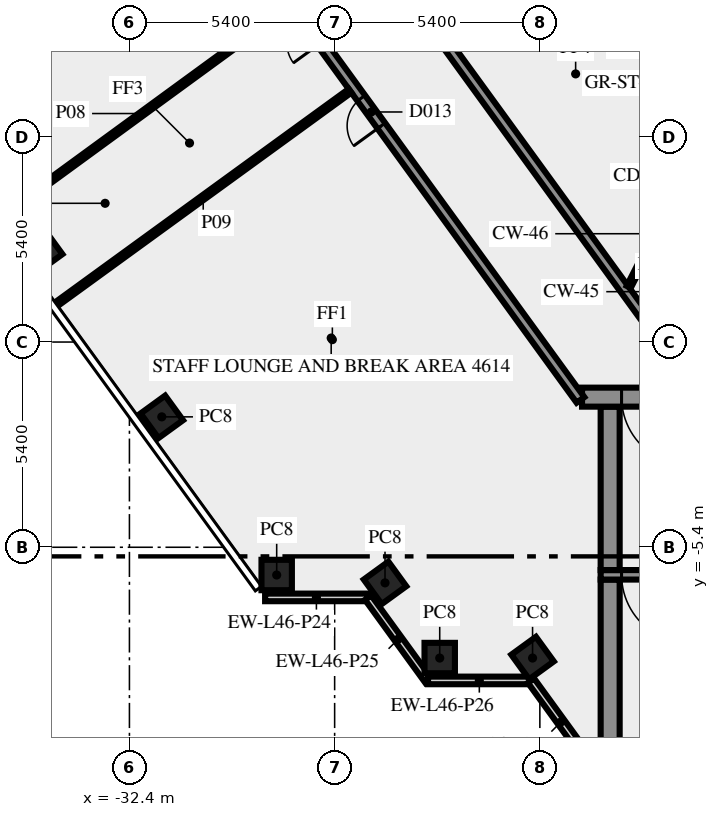
"""IFC4 building model, lengths in metres.
Left out: names, types, materials, properties, quantities, classifications, styles, units other than length and angle.
Written with IfcOpenShell. Run it as: python <this file> out.ifc"""

import sys

from ifc_helpers import new_model, si_unit, direction, frame, frame_2d, origin, origin_2d, place, context, subcontext, project, spatial, rectangle, extrude, element, fill, save


model = new_model("IFC4")
c1 = context("Model", 3, precision=1e-05, world=origin(), true_north=direction((0.0, 1.0)))
c2 = subcontext(c1, "Body", "Model", "MODEL_VIEW")
j1 = project(units=[si_unit("LENGTHUNIT", "METRE"), si_unit("PLANEANGLEUNIT", "RADIAN")], contexts=[c1])
p1 = place(None, origin())
s1 = spatial("IfcSite", under=j1, at=p1, CompositionType="ELEMENT")
p2 = place(p1, origin())
s2 = spatial("IfcBuilding", under=s1, at=p2, CompositionType="ELEMENT")
p3 = place(p2, frame((0.0, 0.0, 198.0)))
s3 = spatial("IfcBuildingStorey", under=s2, at=p3, CompositionType="ELEMENT", Elevation=198.0)
for number, where, z_axis, x_axis in (
    (1, (-34.722, 2.4, 0.0), (0.0, 0.0, 1.0), (0.588, -0.809, 0.0)),
    (2, (-31.548, -1.969, 0.0), (0.0, 0.0, 1.0), (0.588, -0.809, 0.0)),
    (3, (-28.525, -6.13, 0.0), (0.0, 0.0, 1.0), (1.0, 0.0, 0.0)),
    (4, (-25.674, -6.337, 0.0), (0.0, 0.0, 1.0), (0.588, -0.809, 0.0)),
    (5, (-24.235, -8.315, 0.0), (0.0, 0.0, 1.0), (1.0, 0.0, 0.0)),
    (6, (-21.792, -8.315, 0.0), (0.0, 0.0, 1.0), (0.588, -0.809, 0.0)),
):
    element("IfcColumn", number, at=place(p3, frame(where, z_axis=z_axis, x_axis=x_axis)), inside=s3, PredefinedType="COLUMN", context=c2, shape_type="SweptSolid", body=[
        extrude(rectangle(XDim=0.8, YDim=0.8, at=origin_2d()), origin(), (0.0, 0.0, 1.0), 3.65),
    ])
p4 = place(p3, frame((-28.83, -6.719, 0.0), z_axis=(0.0, 0.0, 1.0), x_axis=(1.0, 0.0, 0.0)))
e7 = element("IfcWall", 7, at=p4, inside=s3, PredefinedType="SOLIDWALL", context=c2, shape_type="SweptSolid", body=[
    extrude(rectangle(XDim=2.7, YDim=0.2, at=frame_2d((1.35, 0.0))), origin(), (0.0, 0.0, 1.0), 3.65),
])
p5 = place(p3, frame((-26.12, -6.724, 0.0), z_axis=(0.0, 0.0, 1.0), x_axis=(0.587720002413, -0.809064397168, 0.0)))
e8 = element("IfcWall", 8, at=p5, inside=s3, PredefinedType="SOLIDWALL", context=c2, shape_type="SweptSolid", body=[
    extrude(rectangle(XDim=2.7, YDim=0.2, at=frame_2d((1.35, 0.0))), origin(), (0.0, 0.0, 1.0), 3.65),
])
p6 = place(p3, frame((-24.543, -8.904, 0.0), z_axis=(0.0, 0.0, 1.0), x_axis=(1.0, 0.0, 0.0)))
e9 = element("IfcWall", 9, at=p6, inside=s3, PredefinedType="SOLIDWALL", context=c2, shape_type="SweptSolid", body=[
    extrude(rectangle(XDim=2.7, YDim=0.2, at=frame_2d((1.35, 0.0))), origin(), (0.0, 0.0, 1.0), 3.65),
])
p7 = place(p3, frame((-21.833, -8.909, 0.0), z_axis=(0.0, 0.0, 1.0), x_axis=(0.587766567315, -0.809030569476, 0.0)))
e10 = element("IfcWall", 10, at=p7, inside=s3, PredefinedType="SOLIDWALL", context=c2, shape_type="SweptSolid", body=[
    extrude(rectangle(XDim=2.688, YDim=0.2, at=frame_2d((1.344, 0.0))), origin(), (0.0, 0.0, 1.0), 3.65),
])
p8 = place(p3, frame((-19.75, -10.5, 0.0), z_axis=(0.0, 0.0, 1.0), x_axis=(0.0, 1.0, 0.0)))
e11 = element("IfcWall", 11, at=p8, inside=s3, PredefinedType="SHEAR", context=c2, shape_type="SweptSolid", body=[
    extrude(rectangle(XDim=4.25, YDim=0.5, at=frame_2d((2.125, 0.0))), origin(), (0.0, 0.0, 1.0), 3.65),
])
p9 = place(p3, frame((-9.2, -6.125, 0.0), z_axis=(0.0, 0.0, 1.0), x_axis=(-1.0, 0.0, 0.0)))
e12 = element("IfcWall", 12, at=p9, inside=s3, PredefinedType="SHEAR", context=c2, shape_type="SweptSolid", body=[
    extrude(rectangle(XDim=10.8, YDim=0.25, at=frame_2d((5.4, 0.0))), origin(), (0.0, 0.0, 1.0), 3.65),
])
p10 = place(p9, frame((8.45, 0.0, 0.0)))
e13 = element("IfcOpeningElement", 13, at=p10, cuts=e12, PredefinedType="OPENING", context=c2, shape_type="SweptSolid", body=[
    extrude(rectangle(XDim=1.8, YDim=2.1, at=frame_2d((0.9, 1.05))), frame((0.0, 0.135, 0.0), z_axis=(0.0, -1.0, 0.0), x_axis=(1.0, 0.0, 0.0)), (0.0, 0.0, 1.0), 0.27),
])
p11 = place(p3, frame((-19.75, -6.0, 0.0), z_axis=(0.0, 0.0, 1.0), x_axis=(0.0, 1.0, 0.0)))
e14 = element("IfcWall", 14, at=p11, inside=s3, PredefinedType="SHEAR", context=c2, shape_type="SweptSolid", body=[
    extrude(rectangle(XDim=4.3, YDim=0.5, at=frame_2d((2.15, 0.0))), origin(), (0.0, 0.0, 1.0), 3.65),
])
p12 = place(p3, frame((20.49, -1.45, 0.0), z_axis=(0.0, 0.0, 1.0), x_axis=(-1.0, 0.0, 0.0)))
e15 = element("IfcWall", 15, at=p12, inside=s3, PredefinedType="SHEAR", context=c2, shape_type="SweptSolid", body=[
    extrude(rectangle(XDim=40.98, YDim=0.5, at=frame_2d((20.49, 0.0))), origin(), (0.0, 0.0, 1.0), 3.65),
])
p13 = place(p12, frame((38.14, 0.0, 0.0)))
e16 = element("IfcOpeningElement", 16, at=p13, cuts=e15, PredefinedType="OPENING", context=c2, shape_type="SweptSolid", body=[
    extrude(rectangle(XDim=1.8, YDim=2.1, at=frame_2d((0.9, 1.05))), frame((0.0, 0.26, 0.0), z_axis=(0.0, -1.0, 0.0), x_axis=(1.0, 0.0, 0.0)), (0.0, 0.0, 1.0), 0.52),
])
p14 = place(p12, frame((35.89, 0.0, 0.0)))
e17 = element("IfcOpeningElement", 17, at=p14, cuts=e15, PredefinedType="OPENING", context=c2, shape_type="SweptSolid", body=[
    extrude(rectangle(XDim=0.9, YDim=2.1, at=frame_2d((0.45, 1.05))), frame((0.0, 0.26, 0.0), z_axis=(0.0, -1.0, 0.0), x_axis=(1.0, 0.0, 0.0)), (0.0, 0.0, 1.0), 0.52),
])
p15 = place(p12, frame((32.94, 0.0, 0.0)))
e18 = element("IfcOpeningElement", 18, at=p15, cuts=e15, PredefinedType="OPENING", context=c2, shape_type="SweptSolid", body=[
    extrude(rectangle(XDim=0.9, YDim=2.1, at=frame_2d((0.45, 1.05))), frame((0.0, 0.26, 0.0), z_axis=(0.0, -1.0, 0.0), x_axis=(1.0, 0.0, 0.0)), (0.0, 0.0, 1.0), 0.52),
])
p16 = place(p12, frame((30.302, 0.0, 0.0)))
e19 = element("IfcOpeningElement", 19, at=p16, cuts=e15, PredefinedType="OPENING", context=c2, shape_type="SweptSolid", body=[
    extrude(rectangle(XDim=0.9, YDim=2.1, at=frame_2d((0.45, 1.05))), frame((0.0, 0.26, 0.0), z_axis=(0.0, -1.0, 0.0), x_axis=(1.0, 0.0, 0.0)), (0.0, 0.0, 1.0), 0.52),
])
p17 = place(p12, frame((26.577, 0.0, 0.0)))
e20 = element("IfcOpeningElement", 20, at=p17, cuts=e15, PredefinedType="OPENING", context=c2, shape_type="SweptSolid", body=[
    extrude(rectangle(XDim=0.9, YDim=2.1, at=frame_2d((0.45, 1.05))), frame((0.0, 0.26, 0.0), z_axis=(0.0, -1.0, 0.0), x_axis=(1.0, 0.0, 0.0)), (0.0, 0.0, 1.0), 0.52),
])
p18 = place(p12, frame((19.59, 0.0, 0.0)))
e21 = element("IfcOpeningElement", 21, at=p18, cuts=e15, PredefinedType="OPENING", context=c2, shape_type="SweptSolid", body=[
    extrude(rectangle(XDim=2.0, YDim=2.1, at=frame_2d((1.0, 1.05))), frame((0.0, 0.26, 0.0), z_axis=(0.0, -1.0, 0.0), x_axis=(1.0, 0.0, 0.0)), (0.0, 0.0, 1.0), 0.52),
])
p19 = place(p12, frame((7.14, 0.0, 0.0)))
e22 = element("IfcOpeningElement", 22, at=p19, cuts=e15, PredefinedType="OPENING", context=c2, shape_type="SweptSolid", body=[
    extrude(rectangle(XDim=0.9, YDim=2.1, at=frame_2d((0.45, 1.05))), frame((0.0, 0.26, 0.0), z_axis=(0.0, -1.0, 0.0), x_axis=(1.0, 0.0, 0.0)), (0.0, 0.0, 1.0), 0.52),
])
p20 = place(p12, frame((5.028, 0.0, 0.0)))
e23 = element("IfcOpeningElement", 23, at=p20, cuts=e15, PredefinedType="OPENING", context=c2, shape_type="SweptSolid", body=[
    extrude(rectangle(XDim=0.8, YDim=2.1, at=frame_2d((0.4, 1.05))), frame((0.0, 0.26, 0.0), z_axis=(0.0, -1.0, 0.0), x_axis=(1.0, 0.0, 0.0)), (0.0, 0.0, 1.0), 0.52),
])
p21 = place(p12, frame((3.452, 0.0, 0.0)))
e24 = element("IfcOpeningElement", 24, at=p21, cuts=e15, PredefinedType="OPENING", context=c2, shape_type="SweptSolid", body=[
    extrude(rectangle(XDim=0.8, YDim=2.1, at=frame_2d((0.4, 1.05))), frame((0.0, 0.26, 0.0), z_axis=(0.0, -1.0, 0.0), x_axis=(1.0, 0.0, 0.0)), (0.0, 0.0, 1.0), 0.52),
])
p22 = place(p12, frame((1.04, 0.0, 0.0)))
e25 = element("IfcOpeningElement", 25, at=p22, cuts=e15, PredefinedType="OPENING", context=c2, shape_type="SweptSolid", body=[
    extrude(rectangle(XDim=1.8, YDim=2.1, at=frame_2d((0.9, 1.05))), frame((0.0, 0.26, 0.0), z_axis=(0.0, -1.0, 0.0), x_axis=(1.0, 0.0, 0.0)), (0.0, 0.0, 1.0), 0.52),
])
p23 = place(p3, frame((-20.531, -1.523, 0.0), z_axis=(0.0, 0.0, 1.0), x_axis=(-0.587785812891, 0.809016587076, 0.0)))
e26 = element("IfcWall", 26, at=p23, inside=s3, PredefinedType="SOLIDWALL", context=c2, shape_type="SweptSolid", body=[
    extrude(rectangle(XDim=28.67, YDim=0.25, at=frame_2d((14.335, 0.0))), origin(), (0.0, 0.0, 1.0), 3.65),
])
p24 = place(p23, frame((17.015, 0.0, 0.0)))
e27 = element("IfcOpeningElement", 27, at=p24, cuts=e26, PredefinedType="OPENING", context=c2, shape_type="SweptSolid", body=[
    extrude(rectangle(XDim=0.9, YDim=2.1, at=frame_2d((0.45, 1.05))), frame((0.0, 0.135, 0.0), z_axis=(0.0, -1.0, 0.0), x_axis=(1.0, 0.0, 0.0)), (0.0, 0.0, 1.0), 0.27),
])
p25 = place(p23, frame((8.916, 0.0, 0.0)))
e28 = element("IfcOpeningElement", 28, at=p25, cuts=e26, PredefinedType="OPENING", context=c2, shape_type="SweptSolid", body=[
    extrude(rectangle(XDim=0.9, YDim=2.1, at=frame_2d((0.45, 1.05))), frame((0.0, 0.135, 0.0), z_axis=(0.0, -1.0, 0.0), x_axis=(1.0, 0.0, 0.0)), (0.0, 0.0, 1.0), 0.27),
])
p26 = place(p23, frame((18.616, 0.0, 0.0)))
e29 = element("IfcOpeningElement", 29, at=p26, cuts=e26, PredefinedType="OPENING", context=c2, shape_type="SweptSolid", body=[
    extrude(rectangle(XDim=0.9, YDim=2.1, at=frame_2d((0.45, 1.05))), frame((0.0, 0.135, 0.0), z_axis=(0.0, -1.0, 0.0), x_axis=(1.0, 0.0, 0.0)), (0.0, 0.0, 1.0), 0.27),
])
p27 = place(p23, frame((11.615, 0.0, 0.0)))
e30 = element("IfcOpeningElement", 30, at=p27, cuts=e26, PredefinedType="OPENING", context=c2, shape_type="SweptSolid", body=[
    extrude(rectangle(XDim=0.9, YDim=2.1, at=frame_2d((0.45, 1.05))), frame((0.0, 0.135, 0.0), z_axis=(0.0, -1.0, 0.0), x_axis=(1.0, 0.0, 0.0)), (0.0, 0.0, 1.0), 0.27),
])
p28 = place(p3, frame((-35.092, 23.027, 0.0), z_axis=(0.0, 0.0, 1.0), x_axis=(0.587784076945, -0.809017848313, 0.0)))
e31 = element("IfcWall", 31, at=p28, inside=s3, PredefinedType="SOLIDWALL", context=c2, shape_type="SweptSolid", body=[
    extrude(rectangle(XDim=29.853, YDim=0.25, at=frame_2d((14.927, 0.0))), origin(), (0.0, 0.0, 1.0), 3.65),
])
p29 = place(p28, frame((10.095, 0.0, 0.0)))
e32 = element("IfcOpeningElement", 32, at=p29, cuts=e31, PredefinedType="OPENING", context=c2, shape_type="SweptSolid", body=[
    extrude(rectangle(XDim=0.9, YDim=2.1, at=frame_2d((0.45, 1.05))), frame((0.0, 0.135, 0.0), z_axis=(0.0, -1.0, 0.0), x_axis=(1.0, 0.0, 0.0)), (0.0, 0.0, 1.0), 0.27),
])
p30 = place(p28, frame((15.495, 0.0, 0.0)))
e33 = element("IfcOpeningElement", 33, at=p30, cuts=e31, PredefinedType="OPENING", context=c2, shape_type="SweptSolid", body=[
    extrude(rectangle(XDim=0.9, YDim=2.1, at=frame_2d((0.45, 1.05))), frame((0.0, 0.135, 0.0), z_axis=(0.0, -1.0, 0.0), x_axis=(1.0, 0.0, 0.0)), (0.0, 0.0, 1.0), 0.27),
])
p31 = place(p28, frame((0.224, 0.0, 0.0)))
e34 = element("IfcOpeningElement", 34, at=p31, cuts=e31, PredefinedType="OPENING", context=c2, shape_type="SweptSolid", body=[
    extrude(rectangle(XDim=0.9, YDim=2.1, at=frame_2d((0.45, 1.05))), frame((0.0, 0.135, 0.0), z_axis=(0.0, -1.0, 0.0), x_axis=(1.0, 0.0, 0.0)), (0.0, 0.0, 1.0), 0.27),
])
p32 = place(p3, frame((-31.356, 13.164, 0.0), z_axis=(0.0, 0.0, 1.0), x_axis=(-0.809102944047, -0.587666934526, 0.0)))
e35 = element("IfcWall", 35, at=p32, inside=s3, PredefinedType="PARTITIONING", context=c2, shape_type="SweptSolid", body=[
    extrude(rectangle(XDim=9.55, YDim=0.12, at=frame_2d((4.775, 0.0))), origin(), (0.0, 0.0, 1.0), 2.85),
])
p33 = place(p3, frame((-35.919, 3.197, 0.0), z_axis=(0.0, 0.0, 1.0), x_axis=(0.807645841498, 0.589667868135, 0.0)))
e36 = element("IfcWall", 36, at=p33, inside=s3, PredefinedType="PARTITIONING", context=c2, shape_type="SweptSolid", body=[
    extrude(rectangle(XDim=9.551, YDim=0.12, at=frame_2d((4.775, 0.0))), origin(), (0.0, 0.0, 1.0), 2.85),
])
p34 = place(p3, frame((-26.595, 6.611, 0.0), z_axis=(0.0, 0.0, 1.0), x_axis=(-0.80900684162, -0.587799226107, 0.0)))
e37 = element("IfcWall", 37, at=p34, inside=s3, PredefinedType="PARTITIONING", context=c2, shape_type="SweptSolid", body=[
    extrude(rectangle(XDim=9.55, YDim=0.12, at=frame_2d((4.775, 0.0))), origin(), (0.0, 0.0, 1.0), 2.85),
])
p35 = place(p3, frame((-19.261, 1.45, 0.0), z_axis=(0.0, 0.0, 1.0), x_axis=(0.453950796792, 0.891026752736, 0.0)))
e38 = element("IfcWall", 38, at=p35, inside=s3, PredefinedType="PARTITIONING", context=c2, shape_type="SweptSolid", body=[
    extrude(rectangle(XDim=2.778, YDim=0.12, at=frame_2d((1.389, 0.0))), origin(), (0.0, 0.0, 1.0), 3.65),
])
p36 = place(p10, origin())
e39 = element("IfcDoor", 39, at=p36, inside=s3, OperationType="DOUBLE_DOOR_SINGLE_SWING", PredefinedType="DOOR", context=c2, shape_type="SweptSolid", body=[
    extrude(rectangle(XDim=1.8, YDim=2.1, at=frame_2d((0.9, 1.05))), frame((0.0, 0.025, 0.0), z_axis=(0.0, -1.0, 0.0), x_axis=(1.0, 0.0, 0.0)), (0.0, 0.0, 1.0), 0.05),
])
fill(e13, e39)
p37 = place(p13, origin())
e40 = element("IfcDoor", 40, at=p37, inside=s3, OperationType="DOUBLE_DOOR_SINGLE_SWING", PredefinedType="DOOR", context=c2, shape_type="SweptSolid", body=[
    extrude(rectangle(XDim=1.8, YDim=2.1, at=frame_2d((0.9, 1.05))), frame((0.0, 0.025, 0.0), z_axis=(0.0, -1.0, 0.0), x_axis=(1.0, 0.0, 0.0)), (0.0, 0.0, 1.0), 0.05),
])
fill(e16, e40)
p38 = place(p25, origin())
e41 = element("IfcDoor", 41, at=p38, inside=s3, OperationType="SINGLE_SWING_RIGHT", PredefinedType="DOOR", context=c2, shape_type="SweptSolid", body=[
    extrude(rectangle(XDim=0.9, YDim=2.1, at=frame_2d((0.45, 1.05))), frame((0.0, 0.025, 0.0), z_axis=(0.0, -1.0, 0.0), x_axis=(1.0, 0.0, 0.0)), (0.0, 0.0, 1.0), 0.05),
])
fill(e28, e41)
save(model, sys.argv[1])
